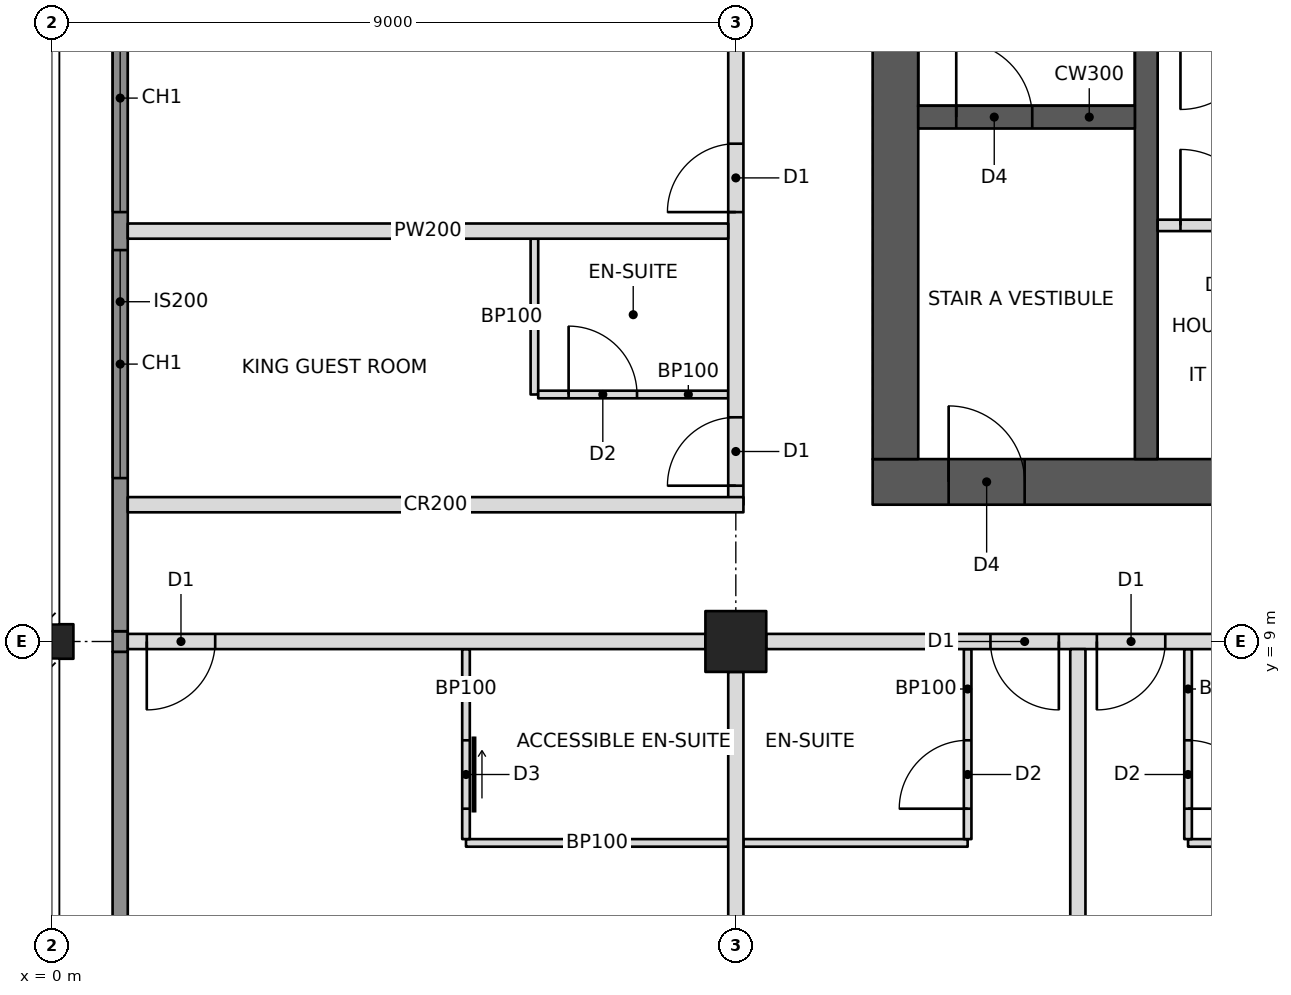
"""IFC4 building model, lengths in metres.
Left out: names, types, materials, properties, quantities, classifications, styles, units other than length and angle.
Written with IfcOpenShell. Run it as: python <this file> out.ifc"""

import sys

from ifc_helpers import new_model, si_unit, direction, frame, frame_2d, origin, origin_2d, place, context, subcontext, project, spatial, rectangle, hollow_rectangle, i_section, extrude, element, fill, save


model = new_model("IFC4")
c1 = context("Model", 3, precision=1e-05, world=origin(), true_north=direction((0.0, 1.0)))
c2 = subcontext(c1, "Body", "Model", "MODEL_VIEW")
j1 = project(units=[si_unit("LENGTHUNIT", "METRE"), si_unit("PLANEANGLEUNIT", "RADIAN")], contexts=[c1])
p1 = place(None, origin())
s1 = spatial("IfcSite", under=j1, at=p1, CompositionType="ELEMENT")
p2 = place(p1, origin())
s2 = spatial("IfcBuilding", under=s1, at=p2, CompositionType="ELEMENT")
p3 = place(p2, frame((0.0, 0.0, 82.4)))
s3 = spatial("IfcBuildingStorey", under=s2, at=p3, CompositionType="ELEMENT", Elevation=82.4)
p4 = place(p3, frame((0.0, 9.0, 0.0), z_axis=(0.0, 0.0, 1.0), x_axis=(0.0, 1.0, 0.0)))
e1 = element("IfcColumn", 1, at=p4, inside=s3, PredefinedType="COLUMN", context=c2, shape_type="SweptSolid", body=[
    extrude(i_section(OverallWidth=0.455, OverallDepth=0.569, WebThickness=0.078, FlangeThickness=0.125, at=origin_2d()), origin(), (0.0, 0.0, 1.0), 3.4),
])
p5 = place(p3, frame((9.0, 9.0, 0.0), z_axis=(0.0, 0.0, 1.0), x_axis=(1.0, 0.0, 0.0)))
e2 = element("IfcColumn", 2, at=p5, inside=s3, PredefinedType="COLUMN", context=c2, shape_type="SweptSolid", body=[
    extrude(hollow_rectangle(XDim=0.8, YDim=0.8, WallThickness=0.09, at=origin_2d()), origin(), (0.0, 0.0, 1.0), 3.4),
])
p6 = place(p3, frame((10.8, 11.1, 0.0), z_axis=(0.0, 0.0, 1.0), x_axis=(1.0, 0.0, 0.0)))
e3 = element("IfcWall", 3, at=p6, inside=s3, PredefinedType="SHEAR", context=c2, shape_type="SweptSolid", body=[
    extrude(rectangle(XDim=23.4, YDim=0.6, at=frame_2d((11.7, 0.0))), origin(), (0.0, 0.0, 1.0), 3.4),
])
p7 = place(p6, frame((1.0, 0.0, 0.0)))
e4 = element("IfcOpeningElement", 4, at=p7, cuts=e3, PredefinedType="OPENING", context=c2, shape_type="SweptSolid", body=[
    extrude(rectangle(XDim=1.0, YDim=2.1, at=frame_2d((0.5, 1.05))), frame((0.0, 0.31, 0.0), z_axis=(0.0, -1.0, 0.0), x_axis=(1.0, 0.0, 0.0)), (0.0, 0.0, 1.0), 0.62),
])
p8 = place(p6, frame((17.2, 0.0, 0.0)))
e5 = element("IfcOpeningElement", 5, at=p8, cuts=e3, PredefinedType="OPENING", context=c2, shape_type="SweptSolid", body=[
    extrude(rectangle(XDim=1.8, YDim=2.1, at=frame_2d((0.9, 1.05))), frame((0.0, 0.31, 0.0), z_axis=(0.0, -1.0, 0.0), x_axis=(1.0, 0.0, 0.0)), (0.0, 0.0, 1.0), 0.62),
])
p9 = place(p3, frame((11.1, 11.4, 0.0), z_axis=(0.0, 0.0, 1.0), x_axis=(0.0, 1.0, 0.0)))
e6 = element("IfcWall", 6, at=p9, inside=s3, PredefinedType="SHEAR", context=c2, shape_type="SweptSolid", body=[
    extrude(rectangle(XDim=13.2, YDim=0.6, at=frame_2d((6.6, 0.0))), origin(), (0.0, 0.0, 1.0), 3.4),
])
p10 = place(p3, frame((14.4, 11.4, 0.0), z_axis=(0.0, 0.0, 1.0), x_axis=(0.0, 1.0, 0.0)))
e7 = element("IfcWall", 7, at=p10, inside=s3, PredefinedType="SHEAR", context=c2, shape_type="SweptSolid", body=[
    extrude(rectangle(XDim=13.2, YDim=0.3, at=frame_2d((6.6, 0.0))), origin(), (0.0, 0.0, 1.0), 3.4),
])
p11 = place(p3, frame((11.4, 15.9, 0.0), z_axis=(0.0, 0.0, 1.0), x_axis=(1.0, 0.0, 0.0)))
e8 = element("IfcWall", 8, at=p11, inside=s3, PredefinedType="SHEAR", context=c2, shape_type="SweptSolid", body=[
    extrude(rectangle(XDim=2.85, YDim=0.3, at=frame_2d((1.425, 0.0))), origin(), (0.0, 0.0, 1.0), 3.4),
])
p12 = place(p11, frame((0.5, 0.0, 0.0)))
e9 = element("IfcOpeningElement", 9, at=p12, cuts=e8, PredefinedType="OPENING", context=c2, shape_type="SweptSolid", body=[
    extrude(rectangle(XDim=1.0, YDim=2.1, at=frame_2d((0.5, 1.05))), frame((0.0, 0.16, 0.0), z_axis=(0.0, -1.0, 0.0), x_axis=(1.0, 0.0, 0.0)), (0.0, 0.0, 1.0), 0.32),
])
p13 = place(p3, frame((1.0, 9.0, 0.0), z_axis=(0.0, 0.0, 1.0), x_axis=(1.0, 0.0, 0.0)))
e10 = element("IfcWall", 10, at=p13, inside=s3, PredefinedType="PARTITIONING", context=c2, shape_type="SweptSolid", body=[
    extrude(rectangle(XDim=7.6, YDim=0.2, at=frame_2d((3.8, 0.0))), origin(), (0.0, 0.0, 1.0), 2.438),
])
p14 = place(p13, frame((0.25, 0.0, 0.0)))
e11 = element("IfcOpeningElement", 11, at=p14, cuts=e10, PredefinedType="OPENING", context=c2, shape_type="SweptSolid", body=[
    extrude(rectangle(XDim=0.9, YDim=2.1, at=frame_2d((0.45, 1.05))), frame((0.0, 0.11, 0.0), z_axis=(0.0, -1.0, 0.0), x_axis=(1.0, 0.0, 0.0)), (0.0, 0.0, 1.0), 0.22),
])
p15 = place(p3, frame((9.4, 9.0, 0.0), z_axis=(0.0, 0.0, 1.0), x_axis=(1.0, 0.0, 0.0)))
e12 = element("IfcWall", 12, at=p15, inside=s3, PredefinedType="PARTITIONING", context=c2, shape_type="SweptSolid", body=[
    extrude(rectangle(XDim=8.2, YDim=0.2, at=frame_2d((4.1, 0.0))), origin(), (0.0, 0.0, 1.0), 2.405),
])
p16 = place(p15, frame((2.95, 0.0, 0.0)))
e13 = element("IfcOpeningElement", 13, at=p16, cuts=e12, PredefinedType="OPENING", context=c2, shape_type="SweptSolid", body=[
    extrude(rectangle(XDim=0.9, YDim=2.1, at=frame_2d((0.45, 1.05))), frame((0.0, 0.11, 0.0), z_axis=(0.0, -1.0, 0.0), x_axis=(1.0, 0.0, 0.0)), (0.0, 0.0, 1.0), 0.22),
])
p17 = place(p15, frame((4.35, 0.0, 0.0)))
e14 = element("IfcOpeningElement", 14, at=p17, cuts=e12, PredefinedType="OPENING", context=c2, shape_type="SweptSolid", body=[
    extrude(rectangle(XDim=0.9, YDim=2.1, at=frame_2d((0.45, 1.05))), frame((0.0, 0.11, 0.0), z_axis=(0.0, -1.0, 0.0), x_axis=(1.0, 0.0, 0.0)), (0.0, 0.0, 1.0), 0.22),
])
p18 = place(p3, frame((9.0, 10.8, 0.0), z_axis=(0.0, 0.0, 1.0), x_axis=(0.0, 1.0, 0.0)))
e15 = element("IfcWall", 15, at=p18, inside=s3, PredefinedType="PARTITIONING", context=c2, shape_type="SweptSolid", body=[
    extrude(rectangle(XDim=6.8, YDim=0.2, at=frame_2d((3.4, 0.0))), origin(), (0.0, 0.0, 1.0), 2.405),
])
p19 = place(p18, frame((0.25, 0.0, 0.0)))
e16 = element("IfcOpeningElement", 16, at=p19, cuts=e15, PredefinedType="OPENING", context=c2, shape_type="SweptSolid", body=[
    extrude(rectangle(XDim=0.9, YDim=2.1, at=frame_2d((0.45, 1.05))), frame((0.0, 0.11, 0.0), z_axis=(0.0, -1.0, 0.0), x_axis=(1.0, 0.0, 0.0)), (0.0, 0.0, 1.0), 0.22),
])
p20 = place(p18, frame((3.85, 0.0, 0.0)))
e17 = element("IfcOpeningElement", 17, at=p20, cuts=e15, PredefinedType="OPENING", context=c2, shape_type="SweptSolid", body=[
    extrude(rectangle(XDim=0.9, YDim=2.1, at=frame_2d((0.45, 1.05))), frame((0.0, 0.11, 0.0), z_axis=(0.0, -1.0, 0.0), x_axis=(1.0, 0.0, 0.0)), (0.0, 0.0, 1.0), 0.22),
])
p21 = place(p3, frame((1.0, 10.8, 0.0), z_axis=(0.0, 0.0, 1.0), x_axis=(1.0, 0.0, 0.0)))
e18 = element("IfcWall", 18, at=p21, inside=s3, PredefinedType="PARTITIONING", context=c2, shape_type="SweptSolid", body=[
    extrude(rectangle(XDim=8.1, YDim=0.2, at=frame_2d((4.05, 0.0))), origin(), (0.0, 0.0, 1.0), 2.404),
])
p22 = place(p3, frame((9.0, 8.6, 0.0), z_axis=(0.0, 0.0, 1.0), x_axis=(0.0, -1.0, 0.0)))
e19 = element("IfcWall", 19, at=p22, inside=s3, PredefinedType="PARTITIONING", context=c2, shape_type="SweptSolid", body=[
    extrude(rectangle(XDim=7.6, YDim=0.2, at=frame_2d((3.8, 0.0))), origin(), (0.0, 0.0, 1.0), 2.438),
])
p23 = place(p3, frame((13.5, 8.9, 0.0), z_axis=(0.0, 0.0, 1.0), x_axis=(0.0, -1.0, 0.0)))
e20 = element("IfcWall", 20, at=p23, inside=s3, PredefinedType="PARTITIONING", context=c2, shape_type="SweptSolid", body=[
    extrude(rectangle(XDim=7.9, YDim=0.2, at=frame_2d((3.95, 0.0))), origin(), (0.0, 0.0, 1.0), 2.404),
])
p24 = place(p3, frame((5.45, 6.35, 0.0), z_axis=(0.0, 0.0, 1.0), x_axis=(1.0, 0.0, 0.0)))
e21 = element("IfcWall", 21, at=p24, inside=s3, PredefinedType="PARTITIONING", context=c2, shape_type="SweptSolid", body=[
    extrude(rectangle(XDim=3.45, YDim=0.1, at=frame_2d((1.725, 0.0))), origin(), (0.0, 0.0, 1.0), 2.438),
])
p25 = place(p3, frame((5.45, 8.9, 0.0), z_axis=(0.0, 0.0, 1.0), x_axis=(0.0, -1.0, 0.0)))
e22 = element("IfcWall", 22, at=p25, inside=s3, PredefinedType="PARTITIONING", context=c2, shape_type="SweptSolid", body=[
    extrude(rectangle(XDim=2.5, YDim=0.1, at=frame_2d((1.25, 0.0))), origin(), (0.0, 0.0, 1.0), 2.438),
])
p26 = place(p25, frame((1.2, 0.0, 0.0)))
e23 = element("IfcOpeningElement", 23, at=p26, cuts=e22, PredefinedType="OPENING", context=c2, shape_type="SweptSolid", body=[
    extrude(rectangle(XDim=0.9, YDim=2.1, at=frame_2d((0.45, 1.05))), frame((0.0, 0.06, 0.0), z_axis=(0.0, -1.0, 0.0), x_axis=(1.0, 0.0, 0.0)), (0.0, 0.0, 1.0), 0.12),
])
p27 = place(p3, frame((9.1, 6.35, 0.0), z_axis=(0.0, 0.0, 1.0), x_axis=(1.0, 0.0, 0.0)))
e24 = element("IfcWall", 24, at=p27, inside=s3, PredefinedType="PARTITIONING", context=c2, shape_type="SweptSolid", body=[
    extrude(rectangle(XDim=2.95, YDim=0.1, at=frame_2d((1.475, 0.0))), origin(), (0.0, 0.0, 1.0), 2.438),
])
p28 = place(p3, frame((12.05, 8.9, 0.0), z_axis=(0.0, 0.0, 1.0), x_axis=(0.0, -1.0, 0.0)))
e25 = element("IfcWall", 25, at=p28, inside=s3, PredefinedType="PARTITIONING", context=c2, shape_type="SweptSolid", body=[
    extrude(rectangle(XDim=2.5, YDim=0.1, at=frame_2d((1.25, 0.0))), origin(), (0.0, 0.0, 1.0), 2.404),
])
p29 = place(p28, frame((1.2, 0.0, 0.0)))
e26 = element("IfcOpeningElement", 26, at=p29, cuts=e25, PredefinedType="OPENING", context=c2, shape_type="SweptSolid", body=[
    extrude(rectangle(XDim=0.9, YDim=2.1, at=frame_2d((0.45, 1.05))), frame((0.0, 0.06, 0.0), z_axis=(0.0, -1.0, 0.0), x_axis=(1.0, 0.0, 0.0)), (0.0, 0.0, 1.0), 0.12),
])
p30 = place(p3, frame((14.95, 6.35, 0.0), z_axis=(0.0, 0.0, 1.0), x_axis=(1.0, 0.0, 0.0)))
e27 = element("IfcWall", 27, at=p30, inside=s3, PredefinedType="PARTITIONING", context=c2, shape_type="SweptSolid", body=[
    extrude(rectangle(XDim=2.95, YDim=0.1, at=frame_2d((1.475, 0.0))), origin(), (0.0, 0.0, 1.0), 2.404),
])
p31 = place(p3, frame((14.95, 8.9, 0.0), z_axis=(0.0, 0.0, 1.0), x_axis=(0.0, -1.0, 0.0)))
e28 = element("IfcWall", 28, at=p31, inside=s3, PredefinedType="PARTITIONING", context=c2, shape_type="SweptSolid", body=[
    extrude(rectangle(XDim=2.5, YDim=0.1, at=frame_2d((1.25, 0.0))), origin(), (0.0, 0.0, 1.0), 2.404),
])
p32 = place(p31, frame((1.2, 0.0, 0.0)))
e29 = element("IfcOpeningElement", 29, at=p32, cuts=e28, PredefinedType="OPENING", context=c2, shape_type="SweptSolid", body=[
    extrude(rectangle(XDim=0.9, YDim=2.1, at=frame_2d((0.45, 1.05))), frame((0.0, 0.06, 0.0), z_axis=(0.0, -1.0, 0.0), x_axis=(1.0, 0.0, 0.0)), (0.0, 0.0, 1.0), 0.12),
])
p33 = place(p3, frame((8.9, 14.4, 0.0), z_axis=(0.0, 0.0, 1.0), x_axis=(-1.0, 0.0, 0.0)))
e30 = element("IfcWall", 30, at=p33, inside=s3, PredefinedType="PARTITIONING", context=c2, shape_type="SweptSolid", body=[
    extrude(rectangle(XDim=7.9, YDim=0.2, at=frame_2d((3.95, 0.0))), origin(), (0.0, 0.0, 1.0), 2.404),
])
p34 = place(p3, frame((6.35, 12.25, 0.0), z_axis=(0.0, 0.0, 1.0), x_axis=(0.0, 1.0, 0.0)))
e31 = element("IfcWall", 31, at=p34, inside=s3, PredefinedType="PARTITIONING", context=c2, shape_type="SweptSolid", body=[
    extrude(rectangle(XDim=2.05, YDim=0.1, at=frame_2d((1.025, 0.0))), origin(), (0.0, 0.0, 1.0), 3.2),
])
p35 = place(p3, frame((8.9, 12.25, 0.0), z_axis=(0.0, 0.0, 1.0), x_axis=(-1.0, 0.0, 0.0)))
e32 = element("IfcWall", 32, at=p35, inside=s3, PredefinedType="PARTITIONING", context=c2, shape_type="SweptSolid", body=[
    extrude(rectangle(XDim=2.5, YDim=0.1, at=frame_2d((1.25, 0.0))), origin(), (0.0, 0.0, 1.0), 2.404),
])
p36 = place(p35, frame((1.2, 0.0, 0.0)))
e33 = element("IfcOpeningElement", 33, at=p36, cuts=e32, PredefinedType="OPENING", context=c2, shape_type="SweptSolid", body=[
    extrude(rectangle(XDim=0.9, YDim=2.1, at=frame_2d((0.45, 1.05))), frame((0.0, 0.06, 0.0), z_axis=(0.0, -1.0, 0.0), x_axis=(1.0, 0.0, 0.0)), (0.0, 0.0, 1.0), 0.12),
])
p37 = place(p3, frame((14.55, 14.475, 0.0), z_axis=(0.0, 0.0, 1.0), x_axis=(1.0, 0.0, 0.0)))
e34 = element("IfcWall", 34, at=p37, inside=s3, PredefinedType="PARTITIONING", context=c2, shape_type="SweptSolid", body=[
    extrude(rectangle(XDim=3.3, YDim=0.15, at=frame_2d((1.65, 0.0))), origin(), (0.0, 0.0, 1.0), 3.2),
])
p38 = place(p37, frame((0.3, 0.0, 0.0)))
e35 = element("IfcOpeningElement", 35, at=p38, cuts=e34, PredefinedType="OPENING", context=c2, shape_type="SweptSolid", body=[
    extrude(rectangle(XDim=1.0, YDim=2.1, at=frame_2d((0.5, 1.05))), frame((0.0, 0.085, 0.0), z_axis=(0.0, -1.0, 0.0), x_axis=(1.0, 0.0, 0.0)), (0.0, 0.0, 1.0), 0.17),
])
p39 = place(p3, frame((0.9, 4.607, 0.0), z_axis=(0.0, 0.0, 1.0), x_axis=(0.0, 1.0, 0.0)))
e36 = element("IfcWall", 36, at=p39, inside=s3, PredefinedType="SOLIDWALL", context=c2, shape_type="SweptSolid", body=[
    extrude(rectangle(XDim=4.257, YDim=0.2, at=frame_2d((2.129, 0.0))), origin(), (0.0, 0.0, 1.0), 3.2),
])
p40 = place(p3, frame((0.9, 8.865, 0.0), z_axis=(0.0, 0.0, 1.0), x_axis=(0.0, 1.0, 0.0)))
e37 = element("IfcWall", 37, at=p40, inside=s3, PredefinedType="SOLIDWALL", context=c2, shape_type="SweptSolid", body=[
    extrude(rectangle(XDim=0.271, YDim=0.2, at=frame_2d((0.135, 0.0))), origin(), (0.0, 0.0, 1.0), 2.438),
])
p41 = place(p3, frame((0.9, 9.135, 0.0), z_axis=(0.0, 0.0, 1.0), x_axis=(0.0, 1.0, 0.0)))
e38 = element("IfcWall", 38, at=p41, inside=s3, PredefinedType="SOLIDWALL", context=c2, shape_type="SweptSolid", body=[
    extrude(rectangle(XDim=8.671, YDim=0.2, at=frame_2d((4.335, 0.0))), origin(), (0.0, 0.0, 1.0), 3.2),
])
p42 = place(p41, frame((2.015, 0.0, 0.6)))
e39 = element("IfcOpeningElement", 39, at=p42, cuts=e38, PredefinedType="OPENING", context=c2, shape_type="SweptSolid", body=[
    extrude(rectangle(XDim=3.0, YDim=2.2, at=frame_2d((1.5, 1.1))), frame((0.0, 0.11, 0.0), z_axis=(0.0, -1.0, 0.0), x_axis=(1.0, 0.0, 0.0)), (0.0, 0.0, 1.0), 0.22),
])
p43 = place(p41, frame((5.515, 0.0, 0.6)))
e40 = element("IfcOpeningElement", 40, at=p43, cuts=e38, PredefinedType="OPENING", context=c2, shape_type="SweptSolid", body=[
    extrude(rectangle(XDim=3.0, YDim=2.2, at=frame_2d((1.5, 1.1))), frame((0.0, 0.11, 0.0), z_axis=(0.0, -1.0, 0.0), x_axis=(1.0, 0.0, 0.0)), (0.0, 0.0, 1.0), 0.22),
])
p44 = place(p42, origin())
e41 = element("IfcWindow", 41, at=p44, inside=s3, PartitioningType="TRIPLE_PANEL_VERTICAL", PredefinedType="WINDOW", context=c2, shape_type="SweptSolid", body=[
    extrude(rectangle(XDim=3.0, YDim=2.2, at=frame_2d((1.5, 1.1))), frame((0.0, 0.03, 0.0), z_axis=(0.0, -1.0, 0.0), x_axis=(1.0, 0.0, 0.0)), (0.0, 0.0, 1.0), 0.06),
])
fill(e39, e41)
p45 = place(p43, origin())
e42 = element("IfcWindow", 42, at=p45, inside=s3, PartitioningType="TRIPLE_PANEL_VERTICAL", PredefinedType="WINDOW", context=c2, shape_type="SweptSolid", body=[
    extrude(rectangle(XDim=3.0, YDim=2.2, at=frame_2d((1.5, 1.1))), frame((0.0, 0.03, 0.0), z_axis=(0.0, -1.0, 0.0), x_axis=(1.0, 0.0, 0.0)), (0.0, 0.0, 1.0), 0.06),
])
fill(e40, e42)
p46 = place(p26, origin())
e43 = element("IfcDoor", 43, at=p46, inside=s3, OperationType="SLIDING_TO_LEFT", PredefinedType="DOOR", context=c2, shape_type="SweptSolid", body=[
    extrude(rectangle(XDim=0.9, YDim=2.1, at=frame_2d((0.45, 1.05))), frame((0.0, 0.025, 0.0), z_axis=(0.0, -1.0, 0.0), x_axis=(1.0, 0.0, 0.0)), (0.0, 0.0, 1.0), 0.05),
])
fill(e23, e43)
p47 = place(p14, frame((0.9, 0.0, 0.0), z_axis=(0.0, 0.0, 1.0), x_axis=(-1.0, 0.0, 0.0)))
e44 = element("IfcDoor", 44, at=p47, inside=s3, OperationType="SINGLE_SWING_RIGHT", PredefinedType="DOOR", context=c2, shape_type="SweptSolid", body=[
    extrude(rectangle(XDim=0.9, YDim=2.1, at=frame_2d((0.45, 1.05))), frame((0.0, 0.025, 0.0), z_axis=(0.0, -1.0, 0.0), x_axis=(1.0, 0.0, 0.0)), (0.0, 0.0, 1.0), 0.05),
])
fill(e11, e44)
p48 = place(p29, frame((0.9, 0.0, 0.0), z_axis=(0.0, 0.0, 1.0), x_axis=(-1.0, 0.0, 0.0)))
e45 = element("IfcDoor", 45, at=p48, inside=s3, OperationType="SINGLE_SWING_LEFT", PredefinedType="DOOR", context=c2, shape_type="SweptSolid", body=[
    extrude(rectangle(XDim=0.9, YDim=2.1, at=frame_2d((0.45, 1.05))), frame((0.0, 0.025, 0.0), z_axis=(0.0, -1.0, 0.0), x_axis=(1.0, 0.0, 0.0)), (0.0, 0.0, 1.0), 0.05),
])
fill(e26, e45)
p49 = place(p16, frame((0.9, 0.0, 0.0), z_axis=(0.0, 0.0, 1.0), x_axis=(-1.0, 0.0, 0.0)))
e46 = element("IfcDoor", 46, at=p49, inside=s3, OperationType="SINGLE_SWING_LEFT", PredefinedType="DOOR", context=c2, shape_type="SweptSolid", body=[
    extrude(rectangle(XDim=0.9, YDim=2.1, at=frame_2d((0.45, 1.05))), frame((0.0, 0.025, 0.0), z_axis=(0.0, -1.0, 0.0), x_axis=(1.0, 0.0, 0.0)), (0.0, 0.0, 1.0), 0.05),
])
fill(e13, e46)
p50 = place(p32, origin())
e47 = element("IfcDoor", 47, at=p50, inside=s3, OperationType="SINGLE_SWING_RIGHT", PredefinedType="DOOR", context=c2, shape_type="SweptSolid", body=[
    extrude(rectangle(XDim=0.9, YDim=2.1, at=frame_2d((0.45, 1.05))), frame((0.0, 0.025, 0.0), z_axis=(0.0, -1.0, 0.0), x_axis=(1.0, 0.0, 0.0)), (0.0, 0.0, 1.0), 0.05),
])
fill(e29, e47)
p51 = place(p17, frame((0.9, 0.0, 0.0), z_axis=(0.0, 0.0, 1.0), x_axis=(-1.0, 0.0, 0.0)))
e48 = element("IfcDoor", 48, at=p51, inside=s3, OperationType="SINGLE_SWING_RIGHT", PredefinedType="DOOR", context=c2, shape_type="SweptSolid", body=[
    extrude(rectangle(XDim=0.9, YDim=2.1, at=frame_2d((0.45, 1.05))), frame((0.0, 0.025, 0.0), z_axis=(0.0, -1.0, 0.0), x_axis=(1.0, 0.0, 0.0)), (0.0, 0.0, 1.0), 0.05),
])
fill(e14, e48)
p52 = place(p36, frame((0.9, 0.0, 0.0), z_axis=(0.0, 0.0, 1.0), x_axis=(-1.0, 0.0, 0.0)))
e49 = element("IfcDoor", 49, at=p52, inside=s3, OperationType="SINGLE_SWING_LEFT", PredefinedType="DOOR", context=c2, shape_type="SweptSolid", body=[
    extrude(rectangle(XDim=0.9, YDim=2.1, at=frame_2d((0.45, 1.05))), frame((0.0, 0.025, 0.0), z_axis=(0.0, -1.0, 0.0), x_axis=(1.0, 0.0, 0.0)), (0.0, 0.0, 1.0), 0.05),
])
fill(e33, e49)
p53 = place(p19, origin())
e50 = element("IfcDoor", 50, at=p53, inside=s3, OperationType="SINGLE_SWING_LEFT", PredefinedType="DOOR", context=c2, shape_type="SweptSolid", body=[
    extrude(rectangle(XDim=0.9, YDim=2.1, at=frame_2d((0.45, 1.05))), frame((0.0, 0.025, 0.0), z_axis=(0.0, -1.0, 0.0), x_axis=(1.0, 0.0, 0.0)), (0.0, 0.0, 1.0), 0.05),
])
fill(e16, e50)
p54 = place(p20, origin())
e51 = element("IfcDoor", 51, at=p54, inside=s3, OperationType="SINGLE_SWING_LEFT", PredefinedType="DOOR", context=c2, shape_type="SweptSolid", body=[
    extrude(rectangle(XDim=0.9, YDim=2.1, at=frame_2d((0.45, 1.05))), frame((0.0, 0.025, 0.0), z_axis=(0.0, -1.0, 0.0), x_axis=(1.0, 0.0, 0.0)), (0.0, 0.0, 1.0), 0.05),
])
fill(e17, e51)
p55 = place(p38, origin())
e52 = element("IfcDoor", 52, at=p55, inside=s3, OperationType="SINGLE_SWING_LEFT", PredefinedType="DOOR", context=c2, shape_type="SweptSolid", body=[
    extrude(rectangle(XDim=1.0, YDim=2.1, at=frame_2d((0.5, 1.05))), frame((0.0, 0.025, 0.0), z_axis=(0.0, -1.0, 0.0), x_axis=(1.0, 0.0, 0.0)), (0.0, 0.0, 1.0), 0.05),
])
fill(e35, e52)
p56 = place(p7, origin())
e53 = element("IfcDoor", 53, at=p56, inside=s3, OperationType="SINGLE_SWING_LEFT", PredefinedType="DOOR", context=c2, shape_type="SweptSolid", body=[
    extrude(rectangle(XDim=1.0, YDim=2.1, at=frame_2d((0.5, 1.05))), frame((0.0, 0.025, 0.0), z_axis=(0.0, -1.0, 0.0), x_axis=(1.0, 0.0, 0.0)), (0.0, 0.0, 1.0), 0.05),
])
fill(e4, e53)
p57 = place(p12, origin())
e54 = element("IfcDoor", 54, at=p57, inside=s3, OperationType="SINGLE_SWING_LEFT", PredefinedType="DOOR", context=c2, shape_type="SweptSolid", body=[
    extrude(rectangle(XDim=1.0, YDim=2.1, at=frame_2d((0.5, 1.05))), frame((0.0, 0.025, 0.0), z_axis=(0.0, -1.0, 0.0), x_axis=(1.0, 0.0, 0.0)), (0.0, 0.0, 1.0), 0.05),
])
fill(e9, e54)
save(model, sys.argv[1])
